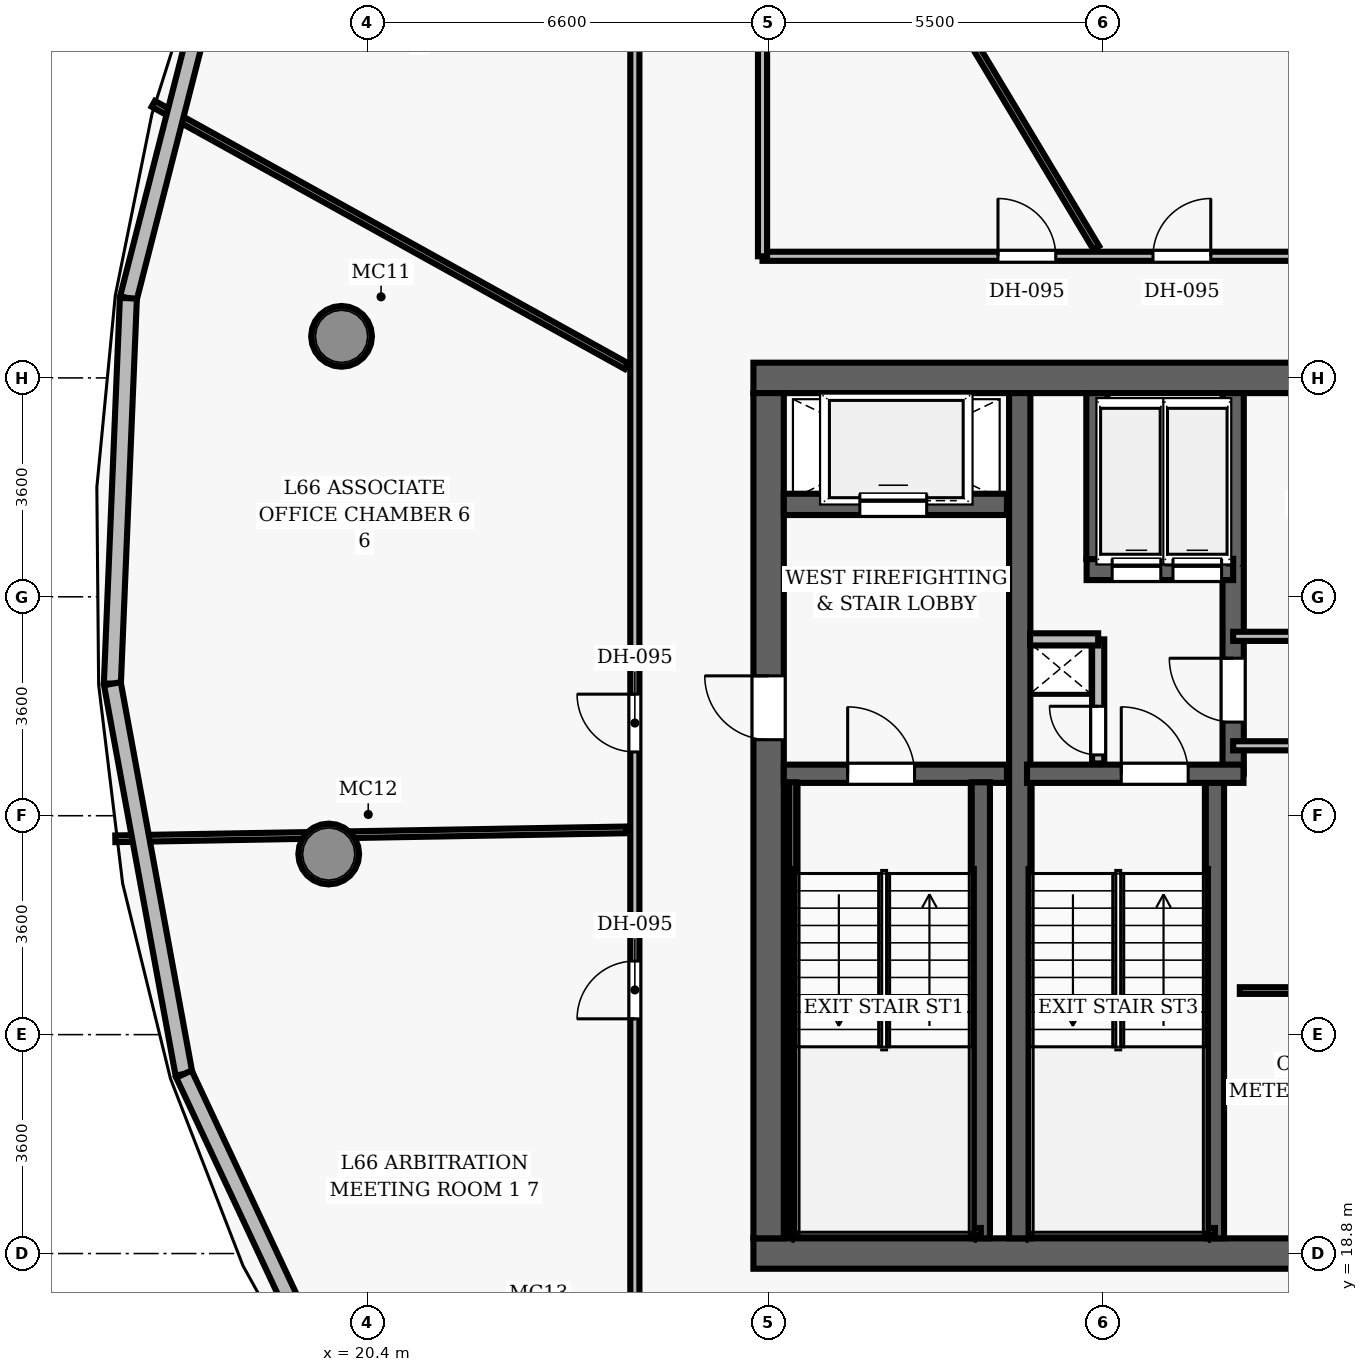
"""IFC4 building model, lengths in metres.
Left out: names, types, materials, properties, quantities, classifications, styles, units other than length and angle.
Written with IfcOpenShell. Run it as: python <this file> out.ifc"""

import sys

from ifc_helpers import new_model, si_unit, direction, frame, frame_2d, origin, origin_2d, place, context, subcontext, project, spatial, rectangle, hollow_circle, extrude, element, fill, save


model = new_model("IFC4")
c1 = context("Model", 3, precision=1e-05, world=origin(), true_north=direction((0.0, 1.0)))
c2 = subcontext(c1, "Body", "Model", "MODEL_VIEW")
j1 = project(units=[si_unit("LENGTHUNIT", "METRE"), si_unit("PLANEANGLEUNIT", "RADIAN")], contexts=[c1])
p1 = place(None, origin())
s1 = spatial("IfcSite", under=j1, at=p1, CompositionType="ELEMENT")
p2 = place(p1, origin())
s2 = spatial("IfcBuilding", under=s1, at=p2, CompositionType="ELEMENT")
p3 = place(p2, frame((0.0, 0.0, 261.3)))
s3 = spatial("IfcBuildingStorey", under=s2, at=p3, CompositionType="ELEMENT", Elevation=261.3)
p4 = place(p3, frame((26.75, 18.8, 0.0), z_axis=(0.0, 0.0, 1.0), x_axis=(1.0, 0.0, 0.0)))
e1 = element("IfcWall", 1, at=p4, inside=s3, PredefinedType="SHEAR", context=c2, shape_type="SweptSolid", body=[
    extrude(rectangle(XDim=22.5, YDim=0.5, at=frame_2d((11.25, 0.0))), origin(), (0.0, 0.0, 1.0), 3.85),
])
p5 = place(p4, frame((14.47, 0.0, 0.0)))
e2 = element("IfcOpeningElement", 2, at=p5, cuts=e1, PredefinedType="OPENING", context=c2, shape_type="SweptSolid", body=[
    extrude(rectangle(XDim=1.05, YDim=2.15, at=frame_2d((0.525, 1.075))), frame((0.0, 0.26, 0.0), z_axis=(0.0, -1.0, 0.0), x_axis=(1.0, 0.0, 0.0)), (0.0, 0.0, 1.0), 0.52),
])
p6 = place(p3, frame((26.75, 33.2, 0.0), z_axis=(0.0, 0.0, 1.0), x_axis=(1.0, 0.0, 0.0)))
e3 = element("IfcWall", 3, at=p6, inside=s3, PredefinedType="SHEAR", context=c2, shape_type="SweptSolid", body=[
    extrude(rectangle(XDim=22.5, YDim=0.5, at=frame_2d((11.25, 0.0))), origin(), (0.0, 0.0, 1.0), 3.85),
])
p7 = place(p3, frame((27.0, 19.05, 0.0), z_axis=(0.0, 0.0, 1.0), x_axis=(0.0, 1.0, 0.0)))
e4 = element("IfcWall", 4, at=p7, inside=s3, PredefinedType="SHEAR", context=c2, shape_type="SweptSolid", body=[
    extrude(rectangle(XDim=13.9, YDim=0.5, at=frame_2d((6.95, 0.0))), origin(), (0.0, 0.0, 1.0), 3.85),
])
p8 = place(p7, frame((8.2, 0.0, 0.0)))
e5 = element("IfcOpeningElement", 5, at=p8, cuts=e4, PredefinedType="OPENING", context=c2, shape_type="SweptSolid", body=[
    extrude(rectangle(XDim=1.05, YDim=2.15, at=frame_2d((0.525, 1.075))), frame((0.0, 0.26, 0.0), z_axis=(0.0, -1.0, 0.0), x_axis=(1.0, 0.0, 0.0)), (0.0, 0.0, 1.0), 0.52),
])
p9 = place(p3, frame((31.13, 19.05, 0.0), z_axis=(0.0, 0.0, 1.0), x_axis=(0.0, 1.0, 0.0)))
e6 = element("IfcWall", 6, at=p9, inside=s3, PredefinedType="SHEAR", context=c2, shape_type="SweptSolid", body=[
    extrude(rectangle(XDim=13.9, YDim=0.35, at=frame_2d((6.95, 0.0))), origin(), (0.0, 0.0, 1.0), 3.85),
])
for number, where, z_axis, x_axis in (
    (7, (19.976, 33.884, 0.0), (0.0, 0.0, 1.0), (1.0, 0.0, 0.0)),
    (8, (19.765, 25.371, 0.0), (0.0, 0.0, 1.0), (1.0, 0.0, 0.0)),
):
    element("IfcColumn", number, at=place(p3, frame(where, z_axis=z_axis, x_axis=x_axis)), inside=s3, PredefinedType="COLUMN", context=c2, shape_type="SweptSolid", body=[
        extrude(hollow_circle(Radius=0.5, WallThickness=0.045, at=origin_2d()), origin(), (0.0, 0.0, 1.0), 3.85),
    ])
p10 = place(p3, frame((27.25, 26.69, 0.0), z_axis=(0.0, 0.0, 1.0), x_axis=(1.0, 0.0, 0.0)))
e9 = element("IfcWall", 9, at=p10, inside=s3, PredefinedType="SHEAR", context=c2, shape_type="SweptSolid", body=[
    extrude(rectangle(XDim=3.67, YDim=0.3, at=frame_2d((1.835, 0.0))), origin(), (0.0, 0.0, 1.0), 3.85),
])
p11 = place(p10, frame((1.05, 0.0, 0.0)))
e10 = element("IfcOpeningElement", 10, at=p11, cuts=e9, PredefinedType="OPENING", context=c2, shape_type="SweptSolid", body=[
    extrude(rectangle(XDim=1.1, YDim=2.15, at=frame_2d((0.55, 1.075))), frame((0.0, 0.16, 0.0), z_axis=(0.0, -1.0, 0.0), x_axis=(1.0, 0.0, 0.0)), (0.0, 0.0, 1.0), 0.32),
])
p12 = place(p3, frame((30.49, 19.05, 0.0), z_axis=(0.0, 0.0, 1.0), x_axis=(0.0, 1.0, 0.0)))
e11 = element("IfcWall", 11, at=p12, inside=s3, PredefinedType="SHEAR", context=c2, shape_type="SweptSolid", body=[
    extrude(rectangle(XDim=7.5, YDim=0.3, at=frame_2d((3.75, 0.0))), origin(), (0.0, 0.0, 1.0), 3.85),
])
p13 = place(p3, frame((27.395, 19.1, 0.0), z_axis=(0.0, 0.0, 1.0), x_axis=(0.0, 1.0, 0.0)))
e12 = element("IfcWall", 12, at=p13, inside=s3, PredefinedType="SHEAR", context=c2, shape_type="SweptSolid", body=[
    extrude(rectangle(XDim=7.45, YDim=0.12, at=frame_2d((3.725, 0.0))), origin(), (0.0, 0.0, 1.0), 3.85),
])
p14 = place(p3, frame((27.395, 19.16, 0.0), z_axis=(0.0, 0.0, 1.0), x_axis=(1.0, 0.0, 0.0)))
e13 = element("IfcWall", 13, at=p14, inside=s3, PredefinedType="SHEAR", context=c2, shape_type="SweptSolid", body=[
    extrude(rectangle(XDim=3.095, YDim=0.12, at=frame_2d((1.547, 0.0))), origin(), (0.0, 0.0, 1.0), 3.85),
])
p15 = place(p3, frame((27.25, 31.12, 0.0), z_axis=(0.0, 0.0, 1.0), x_axis=(1.0, 0.0, 0.0)))
e14 = element("IfcWall", 14, at=p15, inside=s3, PredefinedType="SHEAR", context=c2, shape_type="SweptSolid", body=[
    extrude(rectangle(XDim=3.67, YDim=0.35, at=frame_2d((1.835, 0.0))), origin(), (0.0, 0.0, 1.0), 3.04),
])
p16 = place(p15, frame((1.25, 0.0, 0.0)))
e15 = element("IfcOpeningElement", 15, at=p16, cuts=e14, PredefinedType="OPENING", context=c2, shape_type="SweptSolid", body=[
    extrude(rectangle(XDim=1.1, YDim=2.15, at=frame_2d((0.55, 1.075))), frame((0.0, 0.185, 0.0), z_axis=(0.0, -1.0, 0.0), x_axis=(1.0, 0.0, 0.0)), (0.0, 0.0, 1.0), 0.37),
])
p17 = place(p3, frame((34.34, 19.05, 0.0), z_axis=(0.0, 0.0, 1.0), x_axis=(0.0, 1.0, 0.0)))
e16 = element("IfcWall", 16, at=p17, inside=s3, PredefinedType="SHEAR", context=c2, shape_type="SweptSolid", body=[
    extrude(rectangle(XDim=7.5, YDim=0.3, at=frame_2d((3.75, 0.0))), origin(), (0.0, 0.0, 1.0), 3.85),
])
p18 = place(p3, frame((34.64, 26.69, 0.0), z_axis=(0.0, 0.0, 1.0), x_axis=(0.0, 1.0, 0.0)))
e17 = element("IfcWall", 17, at=p18, inside=s3, PredefinedType="SHEAR", context=c2, shape_type="SweptSolid", body=[
    extrude(rectangle(XDim=6.26, YDim=0.35, at=frame_2d((3.13, 0.0))), origin(), (0.0, 0.0, 1.0), 3.85),
])
p19 = place(p18, frame((0.85, 0.0, 0.0)))
e18 = element("IfcOpeningElement", 18, at=p19, cuts=e17, PredefinedType="OPENING", context=c2, shape_type="SweptSolid", body=[
    extrude(rectangle(XDim=1.05, YDim=2.15, at=frame_2d((0.525, 1.075))), frame((0.0, 0.185, 0.0), z_axis=(0.0, -1.0, 0.0), x_axis=(1.0, 0.0, 0.0)), (0.0, 0.0, 1.0), 0.37),
])
p20 = place(p3, frame((31.25, 26.69, 0.0), z_axis=(0.0, 0.0, 1.0), x_axis=(1.0, 0.0, 0.0)))
e19 = element("IfcWall", 19, at=p20, inside=s3, PredefinedType="SHEAR", context=c2, shape_type="SweptSolid", body=[
    extrude(rectangle(XDim=3.56, YDim=0.3, at=frame_2d((1.78, 0.0))), origin(), (0.0, 0.0, 1.0), 3.85),
])
p21 = place(p20, frame((1.55, 0.0, 0.0)))
e20 = element("IfcOpeningElement", 20, at=p21, cuts=e19, PredefinedType="OPENING", context=c2, shape_type="SweptSolid", body=[
    extrude(rectangle(XDim=1.1, YDim=2.15, at=frame_2d((0.55, 1.075))), frame((0.0, 0.16, 0.0), z_axis=(0.0, -1.0, 0.0), x_axis=(1.0, 0.0, 0.0)), (0.0, 0.0, 1.0), 0.32),
])
p22 = place(p3, frame((31.3, 19.16, 0.0), z_axis=(0.0, 0.0, 1.0), x_axis=(1.0, 0.0, 0.0)))
e21 = element("IfcWall", 21, at=p22, inside=s3, PredefinedType="SHEAR", context=c2, shape_type="SweptSolid", body=[
    extrude(rectangle(XDim=3.04, YDim=0.12, at=frame_2d((1.52, 0.0))), origin(), (0.0, 0.0, 1.0), 3.85),
])
p23 = place(p3, frame((32.23, 30.05, 0.0), z_axis=(0.0, 0.0, 1.0), x_axis=(1.0, 0.0, 0.0)))
e22 = element("IfcWall", 22, at=p23, inside=s3, PredefinedType="SHEAR", context=c2, shape_type="SweptSolid", body=[
    extrude(rectangle(XDim=2.41, YDim=0.35, at=frame_2d((1.205, 0.0))), origin(), (0.0, 0.0, 1.0), 3.04),
])
p24 = place(p23, frame((0.42, 0.0, 0.0)))
e23 = element("IfcOpeningElement", 23, at=p24, cuts=e22, PredefinedType="OPENING", context=c2, shape_type="SweptSolid", body=[
    extrude(rectangle(XDim=0.8, YDim=2.15, at=frame_2d((0.4, 1.075))), frame((0.0, 0.185, 0.0), z_axis=(0.0, -1.0, 0.0), x_axis=(1.0, 0.0, 0.0)), (0.0, 0.0, 1.0), 0.37),
])
p25 = place(p23, frame((1.42, 0.0, 0.0)))
e24 = element("IfcOpeningElement", 24, at=p25, cuts=e22, PredefinedType="OPENING", context=c2, shape_type="SweptSolid", body=[
    extrude(rectangle(XDim=0.8, YDim=2.15, at=frame_2d((0.4, 1.075))), frame((0.0, 0.185, 0.0), z_axis=(0.0, -1.0, 0.0), x_axis=(1.0, 0.0, 0.0)), (0.0, 0.0, 1.0), 0.37),
])
p26 = place(p3, frame((32.4, 30.22, 0.0), z_axis=(0.0, 0.0, 1.0), x_axis=(0.0, 1.0, 0.0)))
e25 = element("IfcWall", 25, at=p26, inside=s3, PredefinedType="SHEAR", context=c2, shape_type="SweptSolid", body=[
    extrude(rectangle(XDim=2.73, YDim=0.35, at=frame_2d((1.365, 0.0))), origin(), (0.0, 0.0, 1.0), 3.04),
])
p27 = place(p3, frame((32.42, 26.86, 0.0), z_axis=(0.0, 0.0, 1.0), x_axis=(0.0, 1.0, 0.0)))
e26 = element("IfcWall", 26, at=p27, inside=s3, PredefinedType="PARTITIONING", context=c2, shape_type="SweptSolid", body=[
    extrude(rectangle(XDim=2.04, YDim=0.2, at=frame_2d((1.02, 0.0))), origin(), (0.0, 0.0, 1.0), 3.04),
])
p28 = place(p27, frame((0.14, 0.0, 0.0)))
e27 = element("IfcOpeningElement", 27, at=p28, cuts=e26, PredefinedType="OPENING", context=c2, shape_type="SweptSolid", body=[
    extrude(rectangle(XDim=0.8, YDim=2.05, at=frame_2d((0.4, 1.025))), frame((0.0, 0.11, 0.0), z_axis=(0.0, -1.0, 0.0), x_axis=(1.0, 0.0, 0.0)), (0.0, 0.0, 1.0), 0.22),
])
p29 = place(p3, frame((31.3, 28.9, 0.0), z_axis=(0.0, 0.0, 1.0), x_axis=(1.0, 0.0, 0.0)))
e28 = element("IfcWall", 28, at=p29, inside=s3, PredefinedType="PARTITIONING", context=c2, shape_type="SweptSolid", body=[
    extrude(rectangle(XDim=1.12, YDim=0.2, at=frame_2d((0.56, 0.0))), origin(), (0.0, 0.0, 1.0), 3.04),
])
for number, where, z_axis, x_axis in (
    (29, (34.64, 27.15, 0.0), (0.0, 0.0, 1.0), (1.0, 0.0, 0.0)),
    (30, (34.64, 28.95, 0.0), (0.0, 0.0, 1.0), (1.0, 0.0, 0.0)),
):
    element("IfcWall", number, at=place(p3, frame(where, z_axis=z_axis, x_axis=x_axis)), inside=s3, PredefinedType="PARTITIONING", context=c2, shape_type="SweptSolid", body=[
        extrude(rectangle(XDim=6.36, YDim=0.15, at=frame_2d((3.18, 0.0))), origin(), (0.0, 0.0, 1.0), 3.04),
    ])
p30 = place(p3, frame((34.75, 23.125, 0.0), z_axis=(0.0, 0.0, 1.0), x_axis=(1.0, 0.0, 0.0)))
e31 = element("IfcWall", 31, at=p30, inside=s3, PredefinedType="PARTITIONING", context=c2, shape_type="SweptSolid", body=[
    extrude(rectangle(XDim=6.25, YDim=0.11, at=frame_2d((3.125, 0.0))), origin(), (0.0, 0.0, 1.0), 3.04),
])
p31 = place(p3, frame((26.9, 35.2, 0.0), z_axis=(0.0, 0.0, 1.0), x_axis=(1.0, 0.0, 0.0)))
e32 = element("IfcWall", 32, at=p31, inside=s3, PredefinedType="PARTITIONING", context=c2, shape_type="SweptSolid", body=[
    extrude(rectangle(XDim=10.05, YDim=0.15, at=frame_2d((5.025, 0.0))), origin(), (0.0, 0.0, 1.0), 3.04),
])
p32 = place(p31, frame((6.422, 0.0, 0.0)))
e33 = element("IfcOpeningElement", 33, at=p32, cuts=e32, PredefinedType="OPENING", context=c2, shape_type="SweptSolid", body=[
    extrude(rectangle(XDim=0.95, YDim=2.15, at=frame_2d((0.475, 1.075))), frame((0.0, 0.085, 0.0), z_axis=(0.0, -1.0, 0.0), x_axis=(1.0, 0.0, 0.0)), (0.0, 0.0, 1.0), 0.17),
])
p33 = place(p31, frame((3.872, 0.0, 0.0)))
e34 = element("IfcOpeningElement", 34, at=p33, cuts=e32, PredefinedType="OPENING", context=c2, shape_type="SweptSolid", body=[
    extrude(rectangle(XDim=0.95, YDim=2.15, at=frame_2d((0.475, 1.075))), frame((0.0, 0.085, 0.0), z_axis=(0.0, -1.0, 0.0), x_axis=(1.0, 0.0, 0.0)), (0.0, 0.0, 1.0), 0.17),
])
p34 = place(p3, frame((24.8, 11.32, 0.0), z_axis=(0.0, 0.0, 1.0), x_axis=(0.0, 1.0, 0.0)))
e35 = element("IfcWall", 35, at=p34, inside=s3, PredefinedType="PARTITIONING", context=c2, shape_type="SweptSolid", body=[
    extrude(rectangle(XDim=30.08, YDim=0.15, at=frame_2d((15.04, 0.0))), origin(), (0.0, 0.0, 1.0), 3.04),
])
p35 = place(p34, frame((15.729, 0.0, 0.0)))
e36 = element("IfcOpeningElement", 36, at=p35, cuts=e35, PredefinedType="OPENING", context=c2, shape_type="SweptSolid", body=[
    extrude(rectangle(XDim=0.95, YDim=2.15, at=frame_2d((0.475, 1.075))), frame((0.0, 0.085, 0.0), z_axis=(0.0, -1.0, 0.0), x_axis=(1.0, 0.0, 0.0)), (0.0, 0.0, 1.0), 0.17),
])
p36 = place(p34, frame((11.34, 0.0, 0.0)))
e37 = element("IfcOpeningElement", 37, at=p36, cuts=e35, PredefinedType="OPENING", context=c2, shape_type="SweptSolid", body=[
    extrude(rectangle(XDim=0.95, YDim=2.15, at=frame_2d((0.475, 1.075))), frame((0.0, 0.085, 0.0), z_axis=(0.0, -1.0, 0.0), x_axis=(1.0, 0.0, 0.0)), (0.0, 0.0, 1.0), 0.17),
])
p37 = place(p3, frame((26.9, 35.2, 0.0), z_axis=(0.0, 0.0, 1.0), x_axis=(0.0, 1.0, 0.0)))
e38 = element("IfcWall", 38, at=p37, inside=s3, PredefinedType="PARTITIONING", context=c2, shape_type="SweptSolid", body=[
    extrude(rectangle(XDim=6.2, YDim=0.15, at=frame_2d((3.1, 0.0))), origin(), (0.0, 0.0, 1.0), 3.04),
])
p38 = place(p3, frame((32.388, 35.34, 0.0), z_axis=(0.0, 0.0, 1.0), x_axis=(-0.515043577983, 0.857163994098, 0.0)))
e39 = element("IfcWall", 39, at=p38, inside=s3, PredefinedType="PARTITIONING", context=c2, shape_type="SweptSolid", body=[
    extrude(rectangle(XDim=15.464, YDim=0.11, at=frame_2d((7.732, 0.0))), origin(), (0.0, 0.0, 1.0), 3.04),
])
p39 = place(p3, frame((24.66, 33.395, 0.0), z_axis=(0.0, 0.0, 1.0), x_axis=(-0.874626832341, 0.48479676582, 0.0)))
e40 = element("IfcWall", 40, at=p39, inside=s3, PredefinedType="PARTITIONING", context=c2, shape_type="SweptSolid", body=[
    extrude(rectangle(XDim=8.895, YDim=0.11, at=frame_2d((4.448, 0.0))), origin(), (0.0, 0.0, 1.0), 3.04),
])
p40 = place(p3, frame((24.66, 25.767, 0.0), z_axis=(0.0, 0.0, 1.0), x_axis=(-0.999848137376, -0.017427053289, 0.0)))
e41 = element("IfcWall", 41, at=p40, inside=s3, PredefinedType="PARTITIONING", context=c2, shape_type="SweptSolid", body=[
    extrude(rectangle(XDim=8.406, YDim=0.11, at=frame_2d((4.203, 0.0))), origin(), (0.0, 0.0, 1.0), 3.04),
])
p41 = place(p3, frame((16.47, 34.511, 0.0), z_axis=(0.0, 0.0, 1.0), x_axis=(0.247972381677, 0.968767102004, 0.0)))
e42 = element("IfcWall", 42, at=p41, inside=s3, PredefinedType="SOLIDWALL", context=c2, shape_type="SweptSolid", body=[
    extrude(rectangle(XDim=5.86, YDim=0.28, at=frame_2d((2.93, 0.0))), origin(), (0.0, 0.0, 1.0), 3.625),
])
p42 = place(p3, frame((16.207, 28.171, 0.0), z_axis=(0.0, 0.0, 1.0), x_axis=(0.04151531728, 0.999137867579, 0.0)))
e43 = element("IfcWall", 43, at=p42, inside=s3, PredefinedType="SOLIDWALL", context=c2, shape_type="SweptSolid", body=[
    extrude(rectangle(XDim=6.345, YDim=0.28, at=frame_2d((3.173, 0.0))), origin(), (0.0, 0.0, 1.0), 3.625),
])
p43 = place(p3, frame((17.385, 21.752, 0.0), z_axis=(0.0, 0.0, 1.0), x_axis=(-0.180429210123, 0.983587972748, 0.0)))
e44 = element("IfcWall", 44, at=p43, inside=s3, PredefinedType="SOLIDWALL", context=c2, shape_type="SweptSolid", body=[
    extrude(rectangle(XDim=6.526, YDim=0.28, at=frame_2d((3.263, 0.0))), origin(), (0.0, 0.0, 1.0), 3.625),
])
p44 = place(p3, frame((20.155, 15.842, 0.0), z_axis=(0.0, 0.0, 1.0), x_axis=(-0.424477959748, 0.905438270501, 0.0)))
e45 = element("IfcWall", 45, at=p44, inside=s3, PredefinedType="SOLIDWALL", context=c2, shape_type="SweptSolid", body=[
    extrude(rectangle(XDim=6.527, YDim=0.28, at=frame_2d((3.263, 0.0))), origin(), (0.0, 0.0, 1.0), 3.625),
])
p45 = place(p11, origin())
e46 = element("IfcDoor", 46, at=p45, inside=s3, OperationType="SINGLE_SWING_LEFT", PredefinedType="DOOR", context=c2, shape_type="SweptSolid", body=[
    extrude(rectangle(XDim=1.1, YDim=2.15, at=frame_2d((0.55, 1.075))), frame((0.0, 0.025, 0.0), z_axis=(0.0, -1.0, 0.0), x_axis=(1.0, 0.0, 0.0)), (0.0, 0.0, 1.0), 0.05),
])
fill(e10, e46)
p46 = place(p8, origin())
e47 = element("IfcDoor", 47, at=p46, inside=s3, OperationType="SINGLE_SWING_RIGHT", PredefinedType="DOOR", context=c2, shape_type="SweptSolid", body=[
    extrude(rectangle(XDim=1.05, YDim=2.15, at=frame_2d((0.525, 1.075))), frame((0.0, 0.025, 0.0), z_axis=(0.0, -1.0, 0.0), x_axis=(1.0, 0.0, 0.0)), (0.0, 0.0, 1.0), 0.05),
])
fill(e5, e47)
p47 = place(p21, origin())
e48 = element("IfcDoor", 48, at=p47, inside=s3, OperationType="SINGLE_SWING_LEFT", PredefinedType="DOOR", context=c2, shape_type="SweptSolid", body=[
    extrude(rectangle(XDim=1.1, YDim=2.15, at=frame_2d((0.55, 1.075))), frame((0.0, 0.025, 0.0), z_axis=(0.0, -1.0, 0.0), x_axis=(1.0, 0.0, 0.0)), (0.0, 0.0, 1.0), 0.05),
])
fill(e20, e48)
p48 = place(p28, origin())
e49 = element("IfcDoor", 49, at=p48, inside=s3, OperationType="SINGLE_SWING_RIGHT", PredefinedType="DOOR", context=c2, shape_type="SweptSolid", body=[
    extrude(rectangle(XDim=0.8, YDim=2.05, at=frame_2d((0.4, 1.025))), frame((0.0, 0.025, 0.0), z_axis=(0.0, -1.0, 0.0), x_axis=(1.0, 0.0, 0.0)), (0.0, 0.0, 1.0), 0.05),
])
fill(e27, e49)
p49 = place(p19, origin())
e50 = element("IfcDoor", 50, at=p49, inside=s3, OperationType="SINGLE_SWING_RIGHT", PredefinedType="DOOR", context=c2, shape_type="SweptSolid", body=[
    extrude(rectangle(XDim=1.05, YDim=2.15, at=frame_2d((0.525, 1.075))), frame((0.0, 0.025, 0.0), z_axis=(0.0, -1.0, 0.0), x_axis=(1.0, 0.0, 0.0)), (0.0, 0.0, 1.0), 0.05),
])
fill(e18, e50)
p50 = place(p32, origin())
e51 = element("IfcDoor", 51, at=p50, inside=s3, OperationType="SINGLE_SWING_RIGHT", PredefinedType="DOOR", context=c2, shape_type="SweptSolid", body=[
    extrude(rectangle(XDim=0.95, YDim=2.15, at=frame_2d((0.475, 1.075))), frame((0.0, 0.025, 0.0), z_axis=(0.0, -1.0, 0.0), x_axis=(1.0, 0.0, 0.0)), (0.0, 0.0, 1.0), 0.05),
])
fill(e33, e51)
p51 = place(p33, origin())
e52 = element("IfcDoor", 52, at=p51, inside=s3, OperationType="SINGLE_SWING_LEFT", PredefinedType="DOOR", context=c2, shape_type="SweptSolid", body=[
    extrude(rectangle(XDim=0.95, YDim=2.15, at=frame_2d((0.475, 1.075))), frame((0.0, 0.025, 0.0), z_axis=(0.0, -1.0, 0.0), x_axis=(1.0, 0.0, 0.0)), (0.0, 0.0, 1.0), 0.05),
])
fill(e34, e52)
p52 = place(p35, origin())
e53 = element("IfcDoor", 53, at=p52, inside=s3, OperationType="SINGLE_SWING_RIGHT", PredefinedType="DOOR", context=c2, shape_type="SweptSolid", body=[
    extrude(rectangle(XDim=0.95, YDim=2.15, at=frame_2d((0.475, 1.075))), frame((0.0, 0.025, 0.0), z_axis=(0.0, -1.0, 0.0), x_axis=(1.0, 0.0, 0.0)), (0.0, 0.0, 1.0), 0.05),
])
fill(e36, e53)
p53 = place(p36, origin())
e54 = element("IfcDoor", 54, at=p53, inside=s3, OperationType="SINGLE_SWING_LEFT", PredefinedType="DOOR", context=c2, shape_type="SweptSolid", body=[
    extrude(rectangle(XDim=0.95, YDim=2.15, at=frame_2d((0.475, 1.075))), frame((0.0, 0.025, 0.0), z_axis=(0.0, -1.0, 0.0), x_axis=(1.0, 0.0, 0.0)), (0.0, 0.0, 1.0), 0.05),
])
fill(e37, e54)
p54 = place(p16, origin())
e55 = element("IfcDoor", 55, at=p54, inside=s3, OperationType="SLIDING_TO_LEFT", PredefinedType="DOOR", context=c2, shape_type="SweptSolid", body=[
    extrude(rectangle(XDim=1.1, YDim=2.15, at=frame_2d((0.55, 1.075))), frame((0.0, 0.025, 0.0), z_axis=(0.0, -1.0, 0.0), x_axis=(1.0, 0.0, 0.0)), (0.0, 0.0, 1.0), 0.05),
])
fill(e15, e55)
p55 = place(p24, origin())
e56 = element("IfcDoor", 56, at=p55, inside=s3, OperationType="SLIDING_TO_LEFT", PredefinedType="DOOR", context=c2, shape_type="SweptSolid", body=[
    extrude(rectangle(XDim=0.8, YDim=2.15, at=frame_2d((0.4, 1.075))), frame((0.0, 0.025, 0.0), z_axis=(0.0, -1.0, 0.0), x_axis=(1.0, 0.0, 0.0)), (0.0, 0.0, 1.0), 0.05),
])
fill(e23, e56)
p56 = place(p25, origin())
e57 = element("IfcDoor", 57, at=p56, inside=s3, OperationType="SLIDING_TO_LEFT", PredefinedType="DOOR", context=c2, shape_type="SweptSolid", body=[
    extrude(rectangle(XDim=0.8, YDim=2.15, at=frame_2d((0.4, 1.075))), frame((0.0, 0.025, 0.0), z_axis=(0.0, -1.0, 0.0), x_axis=(1.0, 0.0, 0.0)), (0.0, 0.0, 1.0), 0.05),
])
fill(e24, e57)
save(model, sys.argv[1])
